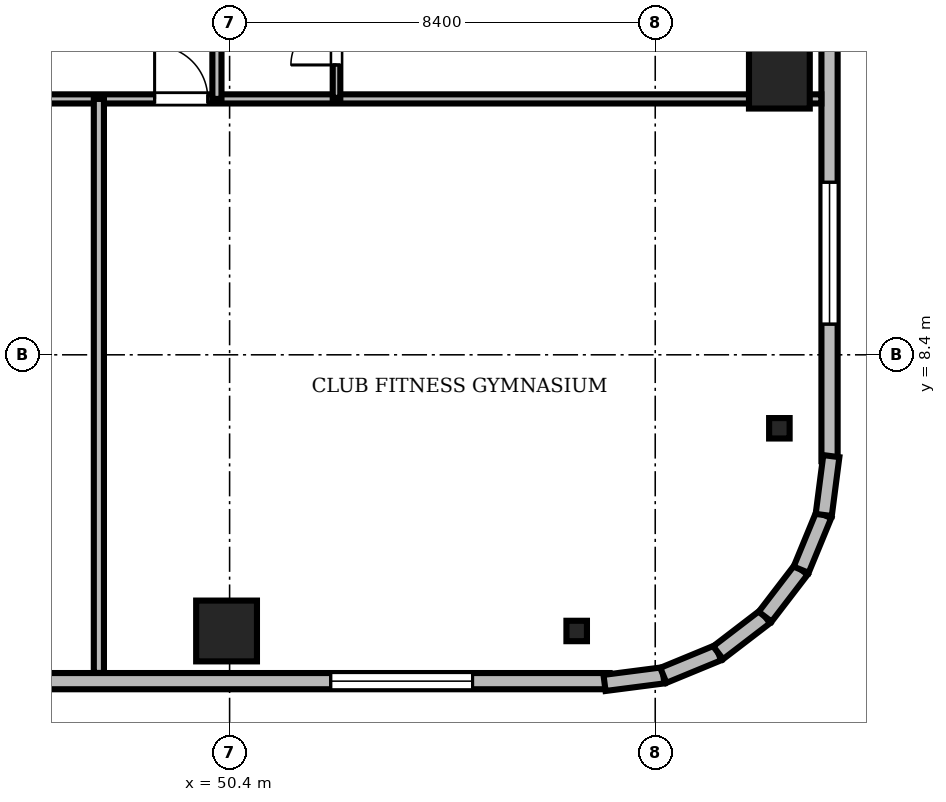
"""IFC4 building model, lengths in metres.
Left out: names, types, materials, properties, quantities, classifications, styles, units other than length and angle.
Written with IfcOpenShell. Run it as: python <this file> out.ifc"""

import sys

from ifc_helpers import new_model, si_unit, direction, frame, frame_2d, origin, origin_2d, place, context, subcontext, project, spatial, rectangle, i_section, extrude, source, transform, mapped, element, fill, save


model = new_model("IFC4")
c1 = context("Model", 3, precision=1e-05, world=origin(), true_north=direction((0.0, 1.0)))
c2 = subcontext(c1, "Body", "Model", "MODEL_VIEW")
j1 = project(units=[si_unit("LENGTHUNIT", "METRE"), si_unit("PLANEANGLEUNIT", "RADIAN")], contexts=[c1])
p1 = place(None, origin())
s1 = spatial("IfcSite", under=j1, at=p1, CompositionType="ELEMENT")
p2 = place(p1, origin())
s2 = spatial("IfcBuilding", under=s1, at=p2, CompositionType="ELEMENT")
p3 = place(p2, frame((0.0, 0.0, 242.7)))
s3 = spatial("IfcBuildingStorey", under=s2, at=p3, CompositionType="ELEMENT", Elevation=242.7)
m1 = source(origin(), c2, "Body", "SweptSolid", [
    extrude(rectangle(XDim=1.2, YDim=1.2, at=origin_2d()), origin(), (0.0, 0.0, 1.0), 3.73),
])
for number, where, z_axis, x_axis in (
    (1, (50.34, 2.95, 0.0), (0.0, 0.0, 1.0), (1.0, 0.0, 0.0)),
    (2, (61.25, 13.86, 0.0), (0.0, 0.0, 1.0), (1.0, 0.0, 0.0)),
):
    element("IfcColumn", number, at=place(p3, frame(where, z_axis=z_axis, x_axis=x_axis)), inside=s3, PredefinedType="COLUMN", context=c2, shape_type="MappedRepresentation", body=[
        mapped(m1, transform((0.0, 0.0, 0.0), scale=1.0)),
    ])
m2 = source(origin(), c2, "Body", "SweptSolid", [
    extrude(i_section(OverallWidth=0.405, OverallDepth=0.403, WebThickness=0.018, FlangeThickness=0.028, FilletRadius=0.015, at=origin_2d()), origin(), (0.0, 0.0, 1.0), 3.73),
])
for number, where, z_axis, x_axis in (
    (3, (57.25, 2.95, 0.0), (0.0, 0.0, 1.0), (1.0, 0.0, 0.0)),
    (4, (61.25, 6.95, 0.0), (0.0, 0.0, 1.0), (1.0, 0.0, 0.0)),
):
    element("IfcColumn", number, at=place(p3, frame(where, z_axis=z_axis, x_axis=x_axis)), inside=s3, PredefinedType="COLUMN", context=c2, shape_type="MappedRepresentation", body=[
        mapped(m2, transform((0.0, 0.0, 0.0), scale=1.0)),
    ])
m3 = source(origin(), c2, "Body", "SweptSolid", [
    extrude(rectangle(XDim=15.6, YDim=0.32, at=frame_2d((7.8, 0.0))), origin(), (0.0, 0.0, 1.0), 3.73),
])
p4 = place(p3, frame((42.3, 1.96, 0.0), z_axis=(0.0, 0.0, 1.0), x_axis=(1.0, 0.0, 0.0)))
e5 = element("IfcWall", 5, at=p4, inside=s3, PredefinedType="SOLIDWALL", context=c2, shape_type="MappedRepresentation", body=[
    mapped(m3, transform((0.0, 0.0, 0.0), scale=1.0)),
])
m4 = source(origin(), c2, "Body", "SweptSolid", [
    extrude(rectangle(XDim=2.8, YDim=2.4, at=frame_2d((1.4, 1.2))), frame((0.0, 0.17, 0.0), z_axis=(0.0, -1.0, 0.0), x_axis=(1.0, 0.0, 0.0)), (0.0, 0.0, 1.0), 0.34),
])
p5 = place(p4, frame((10.095, 0.0, 0.72)))
e6 = element("IfcOpeningElement", 6, at=p5, cuts=e5, PredefinedType="OPENING", context=c2, shape_type="MappedRepresentation", body=[
    mapped(m4, transform((0.0, 0.0, 0.0), scale=1.0)),
])
p6 = place(p3, frame((62.24, 6.3, 0.0), z_axis=(0.0, 0.0, 1.0), x_axis=(0.0, 1.0, 0.0)))
e7 = element("IfcWall", 7, at=p6, inside=s3, PredefinedType="SOLIDWALL", context=c2, shape_type="MappedRepresentation", body=[
    mapped(m3, transform((0.0, 0.0, 0.0), scale=1.0)),
])
m5 = source(origin(), c2, "Body", "SweptSolid", [
    extrude(rectangle(XDim=1.4, YDim=2.3, at=frame_2d((0.7, 1.15))), frame((0.0, 0.17, 0.0), z_axis=(0.0, -1.0, 0.0), x_axis=(1.0, 0.0, 0.0)), (0.0, 0.0, 1.0), 0.34),
])
p7 = place(p6, frame((9.61, 0.0, 0.0)))
e8 = element("IfcOpeningElement", 8, at=p7, cuts=e7, PredefinedType="OPENING", context=c2, shape_type="MappedRepresentation", body=[
    mapped(m5, transform((0.0, 0.0, 0.0), scale=1.0)),
])
p8 = place(p6, frame((2.705, 0.0, 0.72)))
e9 = element("IfcOpeningElement", 9, at=p8, cuts=e7, PredefinedType="OPENING", context=c2, shape_type="MappedRepresentation", body=[
    mapped(m4, transform((0.0, 0.0, 0.0), scale=1.0)),
])
m6 = source(origin(), c2, "Body", "SweptSolid", [
    extrude(rectangle(XDim=1.17, YDim=0.32, at=frame_2d((0.585, 0.0))), origin(), (0.0, 0.0, 1.0), 3.73),
])
p9 = place(p3, frame((57.8, 1.925, 0.0), z_axis=(0.0, 0.0, 1.0), x_axis=(0.991762485493, 0.128090485085, 0.0)))
e10 = element("IfcWall", 10, at=p9, inside=s3, PredefinedType="SOLIDWALL", context=c2, shape_type="MappedRepresentation", body=[
    mapped(m6, transform((0.0, 0.0, 0.0), scale=1.0)),
])
m7 = source(origin(), c2, "Body", "SweptSolid", [
    extrude(rectangle(XDim=1.169, YDim=0.32, at=frame_2d((0.585, 0.0))), origin(), (0.0, 0.0, 1.0), 3.73),
])
p10 = place(p3, frame((58.96, 2.074, 0.0), z_axis=(0.0, 0.0, 1.0), x_axis=(0.924479075121, 0.381232789334, 0.0)))
e11 = element("IfcWall", 11, at=p10, inside=s3, PredefinedType="SOLIDWALL", context=c2, shape_type="MappedRepresentation", body=[
    mapped(m7, transform((0.0, 0.0, 0.0), scale=1.0)),
])
m8 = source(origin(), c2, "Body", "SweptSolid", [
    extrude(rectangle(XDim=1.169, YDim=0.32, at=frame_2d((0.584, 0.0))), origin(), (0.0, 0.0, 1.0), 3.73),
])
p11 = place(p3, frame((60.041, 2.52, 0.0), z_axis=(0.0, 0.0, 1.0), x_axis=(0.793663520347, 0.608356981114, 0.0)))
e12 = element("IfcWall", 12, at=p11, inside=s3, PredefinedType="SOLIDWALL", context=c2, shape_type="MappedRepresentation", body=[
    mapped(m8, transform((0.0, 0.0, 0.0), scale=1.0)),
])
m9 = source(origin(), c2, "Body", "SweptSolid", [
    extrude(rectangle(XDim=1.169, YDim=0.32, at=frame_2d((0.584, 0.0))), origin(), (0.0, 0.0, 1.0), 3.73),
])
for number, where, z_axis, x_axis in (
    (13, (60.969, 3.231, 0.0), (0.0, 0.0, 1.0), (0.608, 0.794, 0.0)),
    (14, (61.68, 4.159, 0.0), (0.0, 0.0, 1.0), (0.381, 0.925, 0.0)),
):
    element("IfcWall", number, at=place(p3, frame(where, z_axis=z_axis, x_axis=x_axis)), inside=s3, PredefinedType="SOLIDWALL", context=c2, shape_type="MappedRepresentation", body=[
        mapped(m9, transform((0.0, 0.0, 0.0), scale=1.0)),
    ])
m10 = source(origin(), c2, "Body", "SweptSolid", [
    extrude(rectangle(XDim=1.171, YDim=0.32, at=frame_2d((0.585, 0.0))), origin(), (0.0, 0.0, 1.0), 3.73),
])
p12 = place(p3, frame((62.125, 5.24, 0.0), z_axis=(0.0, 0.0, 1.0), x_axis=(0.128269133229, 0.991739395941, 0.0)))
e15 = element("IfcWall", 15, at=p12, inside=s3, PredefinedType="SOLIDWALL", context=c2, shape_type="MappedRepresentation", body=[
    mapped(m10, transform((0.0, 0.0, 0.0), scale=1.0)),
])
m11 = source(origin(), c2, "Body", "SweptSolid", [
    extrude(rectangle(XDim=46.156, YDim=0.18, at=frame_2d((23.078, 0.0))), origin(), (0.0, 0.0, 1.0), 2.972),
])
p13 = place(p3, frame((15.922, 13.45, 0.0), z_axis=(0.0, 0.0, 1.0), x_axis=(1.0, 0.0, 0.0)))
e16 = element("IfcWall", 16, at=p13, inside=s3, PredefinedType="PARTITIONING", context=c2, shape_type="MappedRepresentation", body=[
    mapped(m11, transform((0.0, 0.0, 0.0), scale=1.0)),
])
m12 = source(origin(), c2, "Body", "SweptSolid", [
    extrude(rectangle(XDim=1.05, YDim=2.2, at=frame_2d((0.525, 1.1))), frame((0.0, 0.1, 0.0), z_axis=(0.0, -1.0, 0.0), x_axis=(1.0, 0.0, 0.0)), (0.0, 0.0, 1.0), 0.2),
])
p14 = place(p13, frame((5.264, 0.0, 0.0)))
e17 = element("IfcOpeningElement", 17, at=p14, cuts=e16, PredefinedType="OPENING", context=c2, shape_type="MappedRepresentation", body=[
    mapped(m12, transform((0.0, 0.0, 0.0), scale=1.0)),
])
p15 = place(p13, frame((7.872, 0.0, 0.0)))
e18 = element("IfcOpeningElement", 18, at=p15, cuts=e16, PredefinedType="OPENING", context=c2, shape_type="MappedRepresentation", body=[
    mapped(m12, transform((0.0, 0.0, 0.0), scale=1.0)),
])
p16 = place(p13, frame((12.409, 0.0, 0.0)))
e19 = element("IfcOpeningElement", 19, at=p16, cuts=e16, PredefinedType="OPENING", context=c2, shape_type="MappedRepresentation", body=[
    mapped(m12, transform((0.0, 0.0, 0.0), scale=1.0)),
])
m13 = source(origin(), c2, "Body", "SweptSolid", [
    extrude(rectangle(XDim=0.95, YDim=2.15, at=frame_2d((0.475, 1.075))), frame((0.0, 0.1, 0.0), z_axis=(0.0, -1.0, 0.0), x_axis=(1.0, 0.0, 0.0)), (0.0, 0.0, 1.0), 0.2),
])
p17 = place(p13, frame((18.691, 0.0, 0.0)))
e20 = element("IfcOpeningElement", 20, at=p17, cuts=e16, PredefinedType="OPENING", context=c2, shape_type="MappedRepresentation", body=[
    mapped(m13, transform((0.0, 0.0, 0.0), scale=1.0)),
])
p18 = place(p13, frame((23.518, 0.0, 0.0)))
e21 = element("IfcOpeningElement", 21, at=p18, cuts=e16, PredefinedType="OPENING", context=c2, shape_type="MappedRepresentation", body=[
    mapped(m13, transform((0.0, 0.0, 0.0), scale=1.0)),
])
p19 = place(p13, frame((28.1, 0.0, 0.0)))
e22 = element("IfcOpeningElement", 22, at=p19, cuts=e16, PredefinedType="OPENING", context=c2, shape_type="MappedRepresentation", body=[
    mapped(m12, transform((0.0, 0.0, 0.0), scale=1.0)),
])
p20 = place(p13, frame((32.998, 0.0, 0.0)))
e23 = element("IfcOpeningElement", 23, at=p20, cuts=e16, PredefinedType="OPENING", context=c2, shape_type="MappedRepresentation", body=[
    mapped(m12, transform((0.0, 0.0, 0.0), scale=1.0)),
])
m14 = source(origin(), c2, "Body", "SweptSolid", [
    extrude(rectangle(XDim=27.65, YDim=0.18, at=frame_2d((13.825, 0.0))), origin(), (0.0, 0.0, 1.0), 3.172),
])
p21 = place(p3, frame((50.15, 13.45, 0.0), z_axis=(0.0, 0.0, 1.0), x_axis=(0.0, 1.0, 0.0)))
e24 = element("IfcWall", 24, at=p21, inside=s3, PredefinedType="PARTITIONING", context=c2, shape_type="MappedRepresentation", body=[
    mapped(m14, transform((0.0, 0.0, 0.0), scale=1.0)),
])
p22 = place(p21, frame((5.237, 0.0, 0.0)))
e25 = element("IfcOpeningElement", 25, at=p22, cuts=e24, PredefinedType="OPENING", context=c2, shape_type="MappedRepresentation", body=[
    mapped(m12, transform((0.0, 0.0, 0.0), scale=1.0)),
])
p23 = place(p21, frame((14.38, 0.0, 0.0)))
e26 = element("IfcOpeningElement", 26, at=p23, cuts=e24, PredefinedType="OPENING", context=c2, shape_type="MappedRepresentation", body=[
    mapped(m12, transform((0.0, 0.0, 0.0), scale=1.0)),
])
p24 = place(p21, frame((23.523, 0.0, 0.0)))
e27 = element("IfcOpeningElement", 27, at=p24, cuts=e24, PredefinedType="OPENING", context=c2, shape_type="MappedRepresentation", body=[
    mapped(m12, transform((0.0, 0.0, 0.0), scale=1.0)),
])
m15 = source(origin(), c2, "Body", "SweptSolid", [
    extrude(rectangle(XDim=2.29, YDim=0.15, at=frame_2d((1.145, 0.0))), origin(), (0.0, 0.0, 1.0), 3.172),
])
p25 = place(p3, frame((52.51, 13.47, 0.0), z_axis=(0.0, 0.0, 1.0), x_axis=(0.0, 1.0, 0.0)))
e28 = element("IfcWall", 28, at=p25, inside=s3, PredefinedType="PARTITIONING", context=c2, shape_type="MappedRepresentation", body=[
    mapped(m15, transform((0.0, 0.0, 0.0), scale=1.0)),
])
m16 = source(origin(), c2, "Body", "SweptSolid", [
    extrude(rectangle(XDim=0.9, YDim=2.1, at=frame_2d((0.45, 1.05))), frame((0.0, 0.085, 0.0), z_axis=(0.0, -1.0, 0.0), x_axis=(1.0, 0.0, 0.0)), (0.0, 0.0, 1.0), 0.17),
])
p26 = place(p25, frame((0.65, 0.0, 0.0)))
e29 = element("IfcOpeningElement", 29, at=p26, cuts=e28, PredefinedType="OPENING", context=c2, shape_type="MappedRepresentation", body=[
    mapped(m16, transform((0.0, 0.0, 0.0), scale=1.0)),
])
m17 = source(origin(), c2, "Body", "SweptSolid", [
    extrude(rectangle(XDim=11.328, YDim=0.2, at=frame_2d((5.664, 0.0))), origin(), (0.0, 0.0, 1.0), 2.972),
])
p27 = place(p3, frame((47.82, 2.122, 0.0), z_axis=(0.0, 0.0, 1.0), x_axis=(0.0, 1.0, 0.0)))
e30 = element("IfcWall", 30, at=p27, inside=s3, PredefinedType="PARTITIONING", context=c2, shape_type="MappedRepresentation", body=[
    mapped(m17, transform((0.0, 0.0, 0.0), scale=1.0)),
])
m18 = source(origin(), c2, "Body", "SweptSolid", [
    extrude(rectangle(XDim=2.8, YDim=2.4, at=frame_2d((1.4, 1.2))), frame((0.0, 0.03, 0.0), z_axis=(0.0, -1.0, 0.0), x_axis=(1.0, 0.0, 0.0)), (0.0, 0.0, 1.0), 0.06),
])
p28 = place(p5, origin())
e31 = element("IfcWindow", 31, at=p28, inside=s3, PartitioningType="SINGLE_PANEL", PredefinedType="WINDOW", context=c2, shape_type="MappedRepresentation", body=[
    mapped(m18, transform((0.0, 0.0, 0.0), scale=1.0)),
])
fill(e6, e31)
p29 = place(p8, origin())
e32 = element("IfcWindow", 32, at=p29, inside=s3, PartitioningType="SINGLE_PANEL", PredefinedType="WINDOW", context=c2, shape_type="MappedRepresentation", body=[
    mapped(m18, transform((0.0, 0.0, 0.0), scale=1.0)),
])
fill(e9, e32)
m19 = source(origin(), c2, "Body", "SweptSolid", [
    extrude(rectangle(XDim=1.05, YDim=2.2, at=frame_2d((0.525, 1.1))), frame((0.0, 0.025, 0.0), z_axis=(0.0, -1.0, 0.0), x_axis=(1.0, 0.0, 0.0)), (0.0, 0.0, 1.0), 0.05),
])
p30 = place(p20, origin())
e33 = element("IfcDoor", 33, at=p30, inside=s3, OperationType="SINGLE_SWING_LEFT", PredefinedType="DOOR", context=c2, shape_type="MappedRepresentation", body=[
    mapped(m19, transform((0.0, 0.0, 0.0), scale=1.0)),
])
fill(e23, e33)
m20 = source(origin(), c2, "Body", "SweptSolid", [
    extrude(rectangle(XDim=0.9, YDim=2.1, at=frame_2d((0.45, 1.05))), frame((0.0, 0.025, 0.0), z_axis=(0.0, -1.0, 0.0), x_axis=(1.0, 0.0, 0.0)), (0.0, 0.0, 1.0), 0.05),
])
p31 = place(p26, origin())
e34 = element("IfcDoor", 34, at=p31, inside=s3, OperationType="SINGLE_SWING_LEFT", PredefinedType="DOOR", context=c2, shape_type="MappedRepresentation", body=[
    mapped(m20, transform((0.0, 0.0, 0.0), scale=1.0)),
])
fill(e29, e34)
save(model, sys.argv[1])
